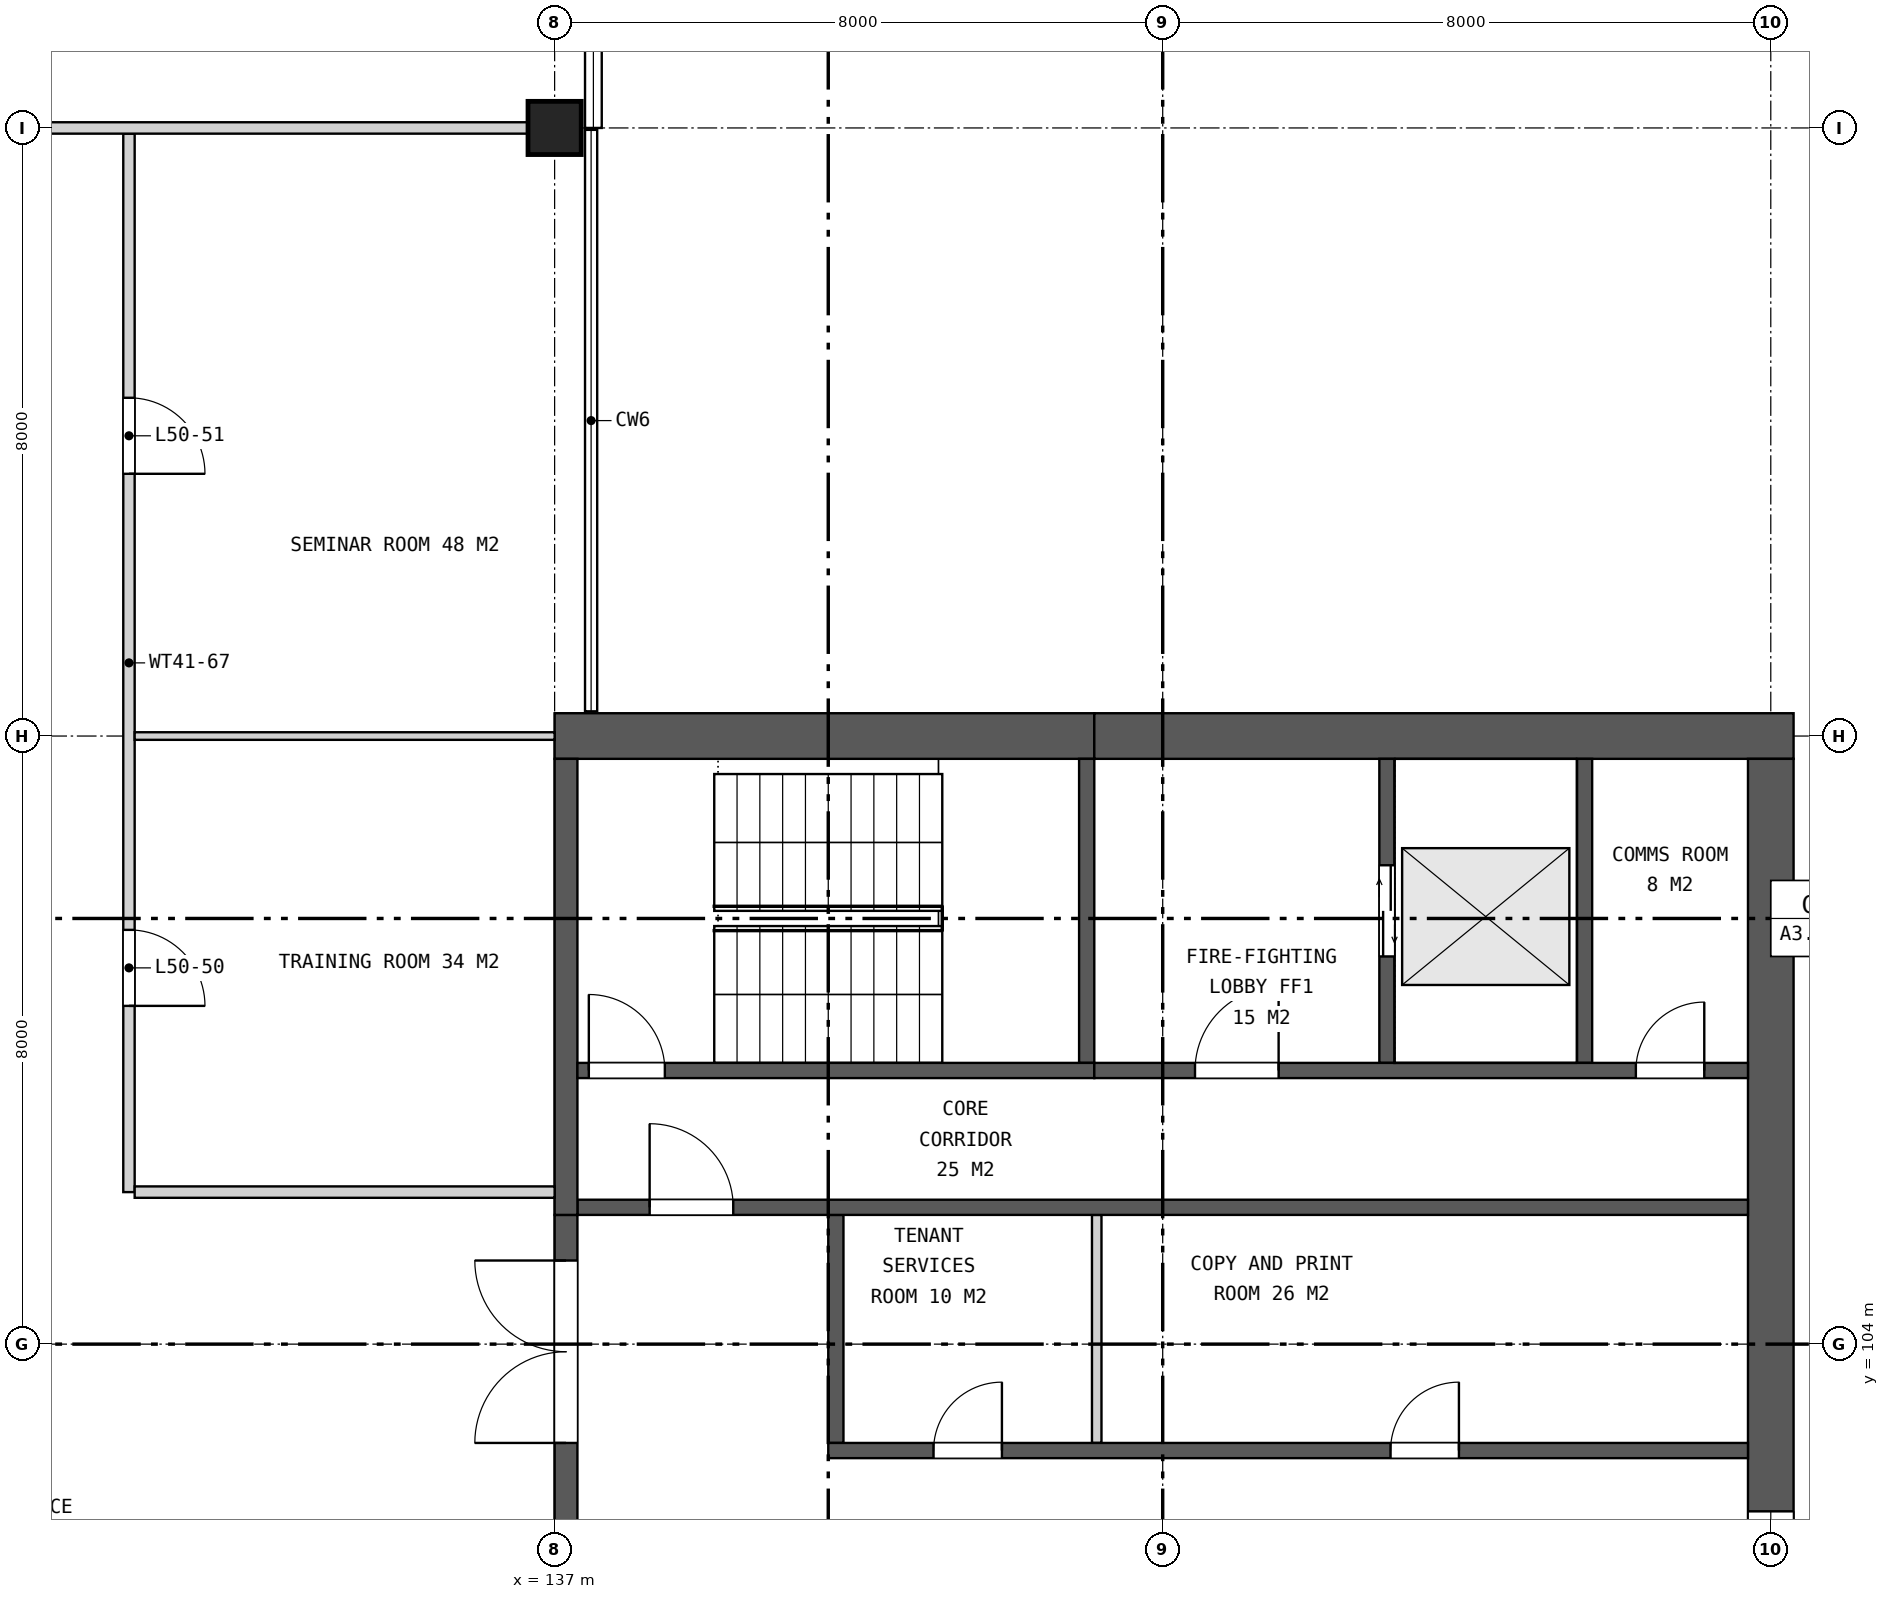
"""IFC4 building model, lengths in metres.
Left out: names, types, materials, properties, quantities, classifications, styles, units other than length and angle.
Written with IfcOpenShell. Run it as: python <this file> out.ifc"""

import sys

from ifc_helpers import new_model, si_unit, direction, frame, frame_2d, origin, origin_2d, place, context, subcontext, project, spatial, rectangle, extrude, element, fill, save


model = new_model("IFC4")
c1 = context("Model", 3, precision=1e-05, world=origin(), true_north=direction((0.0, 1.0)))
c2 = subcontext(c1, "Body", "Model", "MODEL_VIEW")
j1 = project(units=[si_unit("LENGTHUNIT", "METRE"), si_unit("PLANEANGLEUNIT", "RADIAN")], contexts=[c1])
p1 = place(None, origin())
s1 = spatial("IfcSite", under=j1, at=p1, CompositionType="ELEMENT")
p2 = place(p1, origin())
s2 = spatial("IfcBuilding", under=s1, at=p2, CompositionType="ELEMENT")
p3 = place(p2, frame((0.0, 0.0, 233.5)))
s3 = spatial("IfcBuildingStorey", under=s2, at=p3, CompositionType="ELEMENT", Elevation=233.5)
p4 = place(p3, frame((137.0, 120.0, 0.0), z_axis=(0.0, 0.0, 1.0), x_axis=(1.0, 0.0, 0.0)))
e1 = element("IfcColumn", 1, at=p4, inside=s3, PredefinedType="COLUMN", context=c2, shape_type="SweptSolid", body=[
    extrude(rectangle(XDim=0.7, YDim=0.7, at=origin_2d()), origin(), (0.0, 0.0, 1.0), 4.2),
])
p5 = place(p3, frame((137.0, 112.0, 0.0), z_axis=(0.0, 0.0, 1.0), x_axis=(1.0, 0.0, 0.0)))
e2 = element("IfcWall", 2, at=p5, inside=s3, PredefinedType="SHEAR", context=c2, shape_type="SweptSolid", body=[
    extrude(rectangle(XDim=7.1, YDim=0.6, at=frame_2d((3.55, 0.0))), origin(), (0.0, 0.0, 1.0), 4.2),
])
p6 = place(p3, frame((144.1, 112.0, 0.0), z_axis=(0.0, 0.0, 1.0), x_axis=(1.0, 0.0, 0.0)))
e3 = element("IfcWall", 3, at=p6, inside=s3, PredefinedType="SHEAR", context=c2, shape_type="SweptSolid", body=[
    extrude(rectangle(XDim=9.2, YDim=0.6, at=frame_2d((4.6, 0.0))), origin(), (0.0, 0.0, 1.0), 4.2),
])
p7 = place(p3, frame((153.0, 88.3, 0.0), z_axis=(0.0, 0.0, 1.0), x_axis=(0.0, 1.0, 0.0)))
e4 = element("IfcWall", 4, at=p7, inside=s3, PredefinedType="SHEAR", context=c2, shape_type="SweptSolid", body=[
    extrude(rectangle(XDim=23.4, YDim=0.6, at=frame_2d((11.7, 0.0))), origin(), (0.0, 0.0, 1.0), 4.2),
])
p8 = place(p7, frame((9.9, 0.0, 0.15)))
e5 = element("IfcOpeningElement", 5, at=p8, cuts=e4, PredefinedType="OPENING", context=c2, shape_type="SweptSolid", body=[
    extrude(rectangle(XDim=3.6, YDim=3.0, at=frame_2d((1.8, 1.5))), frame((0.0, 0.31, 0.0), z_axis=(0.0, -1.0, 0.0), x_axis=(1.0, 0.0, 0.0)), (0.0, 0.0, 1.0), 0.62),
])
p9 = place(p3, frame((137.15, 94.3, 0.0), z_axis=(0.0, 0.0, 1.0), x_axis=(0.0, 1.0, 0.0)))
e6 = element("IfcWall", 6, at=p9, inside=s3, PredefinedType="SHEAR", context=c2, shape_type="SweptSolid", body=[
    extrude(rectangle(XDim=11.4, YDim=0.3, at=frame_2d((5.7, 0.0))), origin(), (0.0, 0.0, 1.0), 4.2),
])
p10 = place(p9, frame((0.6, 0.0, 0.0)))
e7 = element("IfcOpeningElement", 7, at=p10, cuts=e6, PredefinedType="OPENING", context=c2, shape_type="SweptSolid", body=[
    extrude(rectangle(XDim=2.4, YDim=2.4, at=frame_2d((1.2, 1.2))), frame((0.0, 0.16, 0.0), z_axis=(0.0, -1.0, 0.0), x_axis=(1.0, 0.0, 0.0)), (0.0, 0.0, 1.0), 0.32),
])
p11 = place(p9, frame((4.5, 0.0, 0.0)))
e8 = element("IfcOpeningElement", 8, at=p11, cuts=e6, PredefinedType="OPENING", context=c2, shape_type="SweptSolid", body=[
    extrude(rectangle(XDim=2.4, YDim=2.4, at=frame_2d((1.2, 1.2))), frame((0.0, 0.16, 0.0), z_axis=(0.0, -1.0, 0.0), x_axis=(1.0, 0.0, 0.0)), (0.0, 0.0, 1.0), 0.32),
])
p12 = place(p9, frame((8.4, 0.0, 0.0)))
e9 = element("IfcOpeningElement", 9, at=p12, cuts=e6, PredefinedType="OPENING", context=c2, shape_type="SweptSolid", body=[
    extrude(rectangle(XDim=2.4, YDim=2.4, at=frame_2d((1.2, 1.2))), frame((0.0, 0.16, 0.0), z_axis=(0.0, -1.0, 0.0), x_axis=(1.0, 0.0, 0.0)), (0.0, 0.0, 1.0), 0.32),
])
p13 = place(p3, frame((140.7, 102.7, 0.0), z_axis=(0.0, 0.0, 1.0), x_axis=(0.0, 1.0, 0.0)))
e10 = element("IfcWall", 10, at=p13, inside=s3, PredefinedType="SHEAR", context=c2, shape_type="SweptSolid", body=[
    extrude(rectangle(XDim=3.0, YDim=0.2, at=frame_2d((1.5, 0.0))), origin(), (0.0, 0.0, 1.0), 4.2),
])
p14 = place(p3, frame((144.132, 102.7, 0.0), z_axis=(0.0, 0.0, 1.0), x_axis=(0.0, 1.0, 0.0)))
e11 = element("IfcWall", 11, at=p14, inside=s3, PredefinedType="PARTITIONING", context=c2, shape_type="SweptSolid", body=[
    extrude(rectangle(XDim=3.0, YDim=0.125, at=frame_2d((1.5, 0.0))), origin(), (0.0, 0.0, 1.0), 4.2),
])
p15 = place(p3, frame((140.6, 102.6, 0.0), z_axis=(0.0, 0.0, 1.0), x_axis=(1.0, 0.0, 0.0)))
e12 = element("IfcWall", 12, at=p15, inside=s3, PredefinedType="SHEAR", context=c2, shape_type="SweptSolid", body=[
    extrude(rectangle(XDim=12.1, YDim=0.2, at=frame_2d((6.05, 0.0))), origin(), (0.0, 0.0, 1.0), 4.2),
])
p16 = place(p15, frame((1.385, 0.0, 0.0)))
e13 = element("IfcOpeningElement", 13, at=p16, cuts=e12, PredefinedType="OPENING", context=c2, shape_type="SweptSolid", body=[
    extrude(rectangle(XDim=0.9, YDim=2.1, at=frame_2d((0.45, 1.05))), frame((0.0, 0.11, 0.0), z_axis=(0.0, -1.0, 0.0), x_axis=(1.0, 0.0, 0.0)), (0.0, 0.0, 1.0), 0.22),
])
p17 = place(p15, frame((7.397, 0.0, 0.0)))
e14 = element("IfcOpeningElement", 14, at=p17, cuts=e12, PredefinedType="OPENING", context=c2, shape_type="SweptSolid", body=[
    extrude(rectangle(XDim=0.9, YDim=2.1, at=frame_2d((0.45, 1.05))), frame((0.0, 0.11, 0.0), z_axis=(0.0, -1.0, 0.0), x_axis=(1.0, 0.0, 0.0)), (0.0, 0.0, 1.0), 0.22),
])
p18 = place(p3, frame((137.3, 105.8, 0.0), z_axis=(0.0, 0.0, 1.0), x_axis=(1.0, 0.0, 0.0)))
e15 = element("IfcWall", 15, at=p18, inside=s3, PredefinedType="SHEAR", context=c2, shape_type="SweptSolid", body=[
    extrude(rectangle(XDim=15.4, YDim=0.2, at=frame_2d((7.7, 0.0))), origin(), (0.0, 0.0, 1.0), 4.2),
])
p19 = place(p18, frame((0.95, 0.0, 0.0)))
e16 = element("IfcOpeningElement", 16, at=p19, cuts=e15, PredefinedType="OPENING", context=c2, shape_type="SweptSolid", body=[
    extrude(rectangle(XDim=1.1, YDim=2.1, at=frame_2d((0.55, 1.05))), frame((0.0, 0.11, 0.0), z_axis=(0.0, -1.0, 0.0), x_axis=(1.0, 0.0, 0.0)), (0.0, 0.0, 1.0), 0.22),
])
p20 = place(p3, frame((137.15, 105.7, 0.0), z_axis=(0.0, 0.0, 1.0), x_axis=(0.0, 1.0, 0.0)))
e17 = element("IfcWall", 17, at=p20, inside=s3, PredefinedType="SHEAR", context=c2, shape_type="SweptSolid", body=[
    extrude(rectangle(XDim=6.0, YDim=0.3, at=frame_2d((3.0, 0.0))), origin(), (0.0, 0.0, 1.0), 4.2),
])
p21 = place(p3, frame((144.0, 107.7, 0.0), z_axis=(0.0, 0.0, 1.0), x_axis=(0.0, 1.0, 0.0)))
e18 = element("IfcWall", 18, at=p21, inside=s3, PredefinedType="SHEAR", context=c2, shape_type="SweptSolid", body=[
    extrude(rectangle(XDim=4.0, YDim=0.2, at=frame_2d((2.0, 0.0))), origin(), (0.0, 0.0, 1.0), 4.2),
])
p22 = place(p3, frame((147.95, 107.7, 0.0), z_axis=(0.0, 0.0, 1.0), x_axis=(0.0, 1.0, 0.0)))
e19 = element("IfcWall", 19, at=p22, inside=s3, PredefinedType="SHEAR", context=c2, shape_type="SweptSolid", body=[
    extrude(rectangle(XDim=4.0, YDim=0.2, at=frame_2d((2.0, 0.0))), origin(), (0.0, 0.0, 1.0), 4.2),
])
p23 = place(p22, frame((1.4, 0.0, 0.0)))
e20 = element("IfcOpeningElement", 20, at=p23, cuts=e19, PredefinedType="OPENING", context=c2, shape_type="SweptSolid", body=[
    extrude(rectangle(XDim=1.2, YDim=2.1, at=frame_2d((0.6, 1.05))), frame((0.0, 0.11, 0.0), z_axis=(0.0, -1.0, 0.0), x_axis=(1.0, 0.0, 0.0)), (0.0, 0.0, 1.0), 0.22),
])
p24 = place(p3, frame((150.55, 107.7, 0.0), z_axis=(0.0, 0.0, 1.0), x_axis=(0.0, 1.0, 0.0)))
e21 = element("IfcWall", 21, at=p24, inside=s3, PredefinedType="SHEAR", context=c2, shape_type="SweptSolid", body=[
    extrude(rectangle(XDim=4.0, YDim=0.2, at=frame_2d((2.0, 0.0))), origin(), (0.0, 0.0, 1.0), 4.2),
])
p25 = place(p3, frame((137.3, 107.6, 0.0), z_axis=(0.0, 0.0, 1.0), x_axis=(1.0, 0.0, 0.0)))
e22 = element("IfcWall", 22, at=p25, inside=s3, PredefinedType="SHEAR", context=c2, shape_type="SweptSolid", body=[
    extrude(rectangle(XDim=6.8, YDim=0.2, at=frame_2d((3.4, 0.0))), origin(), (0.0, 0.0, 1.0), 4.2),
])
p26 = place(p25, frame((0.15, 0.0, 0.0)))
e23 = element("IfcOpeningElement", 23, at=p26, cuts=e22, PredefinedType="OPENING", context=c2, shape_type="SweptSolid", body=[
    extrude(rectangle(XDim=1.0, YDim=2.1, at=frame_2d((0.5, 1.05))), frame((0.0, 0.11, 0.0), z_axis=(0.0, -1.0, 0.0), x_axis=(1.0, 0.0, 0.0)), (0.0, 0.0, 1.0), 0.22),
])
p27 = place(p3, frame((144.1, 107.6, 0.0), z_axis=(0.0, 0.0, 1.0), x_axis=(1.0, 0.0, 0.0)))
e24 = element("IfcWall", 24, at=p27, inside=s3, PredefinedType="SHEAR", context=c2, shape_type="SweptSolid", body=[
    extrude(rectangle(XDim=8.6, YDim=0.2, at=frame_2d((4.3, 0.0))), origin(), (0.0, 0.0, 1.0), 4.2),
])
p28 = place(p27, frame((1.325, 0.0, 0.0)))
e25 = element("IfcOpeningElement", 25, at=p28, cuts=e24, PredefinedType="OPENING", context=c2, shape_type="SweptSolid", body=[
    extrude(rectangle(XDim=1.1, YDim=2.1, at=frame_2d((0.55, 1.05))), frame((0.0, 0.11, 0.0), z_axis=(0.0, -1.0, 0.0), x_axis=(1.0, 0.0, 0.0)), (0.0, 0.0, 1.0), 0.22),
])
p29 = place(p27, frame((7.125, 0.0, 0.0)))
e26 = element("IfcOpeningElement", 26, at=p29, cuts=e24, PredefinedType="OPENING", context=c2, shape_type="SweptSolid", body=[
    extrude(rectangle(XDim=0.9, YDim=2.1, at=frame_2d((0.45, 1.05))), frame((0.0, 0.11, 0.0), z_axis=(0.0, -1.0, 0.0), x_axis=(1.0, 0.0, 0.0)), (0.0, 0.0, 1.0), 0.22),
])
p30 = place(p3, frame((131.4, 106.0, 0.0), z_axis=(0.0, 0.0, 1.0), x_axis=(0.0, 1.0, 0.0)))
e27 = element("IfcWall", 27, at=p30, inside=s3, PredefinedType="PARTITIONING", context=c2, shape_type="SweptSolid", body=[
    extrude(rectangle(XDim=13.925, YDim=0.15, at=frame_2d((6.962, 0.0))), origin(), (0.0, 0.0, 1.0), 3.255),
])
p31 = place(p30, frame((2.45, 0.0, 0.0)))
e28 = element("IfcOpeningElement", 28, at=p31, cuts=e27, PredefinedType="OPENING", context=c2, shape_type="SweptSolid", body=[
    extrude(rectangle(XDim=1.0, YDim=2.1, at=frame_2d((0.5, 1.05))), frame((0.0, 0.085, 0.0), z_axis=(0.0, -1.0, 0.0), x_axis=(1.0, 0.0, 0.0)), (0.0, 0.0, 1.0), 0.17),
])
p32 = place(p30, frame((9.45, 0.0, 0.0)))
e29 = element("IfcOpeningElement", 29, at=p32, cuts=e27, PredefinedType="OPENING", context=c2, shape_type="SweptSolid", body=[
    extrude(rectangle(XDim=1.0, YDim=2.1, at=frame_2d((0.5, 1.05))), frame((0.0, 0.085, 0.0), z_axis=(0.0, -1.0, 0.0), x_axis=(1.0, 0.0, 0.0)), (0.0, 0.0, 1.0), 0.17),
])
p33 = place(p3, frame((131.475, 106.0, 0.0), z_axis=(0.0, 0.0, 1.0), x_axis=(1.0, 0.0, 0.0)))
e30 = element("IfcWall", 30, at=p33, inside=s3, PredefinedType="PARTITIONING", context=c2, shape_type="SweptSolid", body=[
    extrude(rectangle(XDim=5.525, YDim=0.15, at=frame_2d((2.762, 0.0))), origin(), (0.0, 0.0, 1.0), 3.255),
])
p34 = place(p3, frame((131.475, 112.0, 0.0), z_axis=(0.0, 0.0, 1.0), x_axis=(1.0, 0.0, 0.0)))
e31 = element("IfcWall", 31, at=p34, inside=s3, PredefinedType="PARTITIONING", context=c2, shape_type="SweptSolid", body=[
    extrude(rectangle(XDim=5.525, YDim=0.1, at=frame_2d((2.762, 0.0))), origin(), (0.0, 0.0, 1.0), 3.255),
])
p35 = place(p3, frame((118.7, 120.0, 0.0), z_axis=(0.0, 0.0, 1.0), x_axis=(1.0, 0.0, 0.0)))
e32 = element("IfcWall", 32, at=p35, inside=s3, PredefinedType="PARTITIONING", context=c2, shape_type="SweptSolid", body=[
    extrude(rectangle(XDim=18.62, YDim=0.15, at=frame_2d((9.31, 0.0))), origin(), (0.0, 0.0, 1.0), 3.255),
])
p36 = place(p35, frame((5.45, 0.0, 0.0)))
e33 = element("IfcOpeningElement", 33, at=p36, cuts=e32, PredefinedType="OPENING", context=c2, shape_type="SweptSolid", body=[
    extrude(rectangle(XDim=1.8, YDim=2.1, at=frame_2d((0.9, 1.05))), frame((0.0, 0.085, 0.0), z_axis=(0.0, -1.0, 0.0), x_axis=(1.0, 0.0, 0.0)), (0.0, 0.0, 1.0), 0.17),
])
p37 = place(p8, origin())
e34 = element("IfcWindow", 34, at=p37, inside=s3, PartitioningType="SINGLE_PANEL", PredefinedType="WINDOW", context=c2, shape_type="SweptSolid", body=[
    extrude(rectangle(XDim=3.6, YDim=3.0, at=frame_2d((1.8, 1.5))), frame((0.0, 0.03, 0.0), z_axis=(0.0, -1.0, 0.0), x_axis=(1.0, 0.0, 0.0)), (0.0, 0.0, 1.0), 0.06),
])
fill(e5, e34)
p38 = place(p12, origin())
e35 = element("IfcDoor", 35, at=p38, inside=s3, OperationType="DOUBLE_DOOR_SINGLE_SWING", PredefinedType="DOOR", context=c2, shape_type="SweptSolid", body=[
    extrude(rectangle(XDim=2.4, YDim=2.4, at=frame_2d((1.2, 1.2))), frame((0.0, 0.025, 0.0), z_axis=(0.0, -1.0, 0.0), x_axis=(1.0, 0.0, 0.0)), (0.0, 0.0, 1.0), 0.05),
])
fill(e9, e35)
p39 = place(p16, origin())
e36 = element("IfcDoor", 36, at=p39, inside=s3, OperationType="SINGLE_SWING_RIGHT", PredefinedType="DOOR", context=c2, shape_type="SweptSolid", body=[
    extrude(rectangle(XDim=0.9, YDim=2.1, at=frame_2d((0.45, 1.05))), frame((0.0, 0.025, 0.0), z_axis=(0.0, -1.0, 0.0), x_axis=(1.0, 0.0, 0.0)), (0.0, 0.0, 1.0), 0.05),
])
fill(e13, e36)
p40 = place(p17, origin())
e37 = element("IfcDoor", 37, at=p40, inside=s3, OperationType="SINGLE_SWING_RIGHT", PredefinedType="DOOR", context=c2, shape_type="SweptSolid", body=[
    extrude(rectangle(XDim=0.9, YDim=2.1, at=frame_2d((0.45, 1.05))), frame((0.0, 0.025, 0.0), z_axis=(0.0, -1.0, 0.0), x_axis=(1.0, 0.0, 0.0)), (0.0, 0.0, 1.0), 0.05),
])
fill(e14, e37)
p41 = place(p19, origin())
e38 = element("IfcDoor", 38, at=p41, inside=s3, OperationType="SINGLE_SWING_LEFT", PredefinedType="DOOR", context=c2, shape_type="SweptSolid", body=[
    extrude(rectangle(XDim=1.1, YDim=2.1, at=frame_2d((0.55, 1.05))), frame((0.0, 0.025, 0.0), z_axis=(0.0, -1.0, 0.0), x_axis=(1.0, 0.0, 0.0)), (0.0, 0.0, 1.0), 0.05),
])
fill(e16, e38)
p42 = place(p23, origin())
e39 = element("IfcDoor", 39, at=p42, inside=s3, OperationType="DOUBLE_DOOR_SLIDING", PredefinedType="DOOR", context=c2, shape_type="SweptSolid", body=[
    extrude(rectangle(XDim=1.2, YDim=2.1, at=frame_2d((0.6, 1.05))), frame((0.0, 0.025, 0.0), z_axis=(0.0, -1.0, 0.0), x_axis=(1.0, 0.0, 0.0)), (0.0, 0.0, 1.0), 0.05),
])
fill(e20, e39)
p43 = place(p26, origin())
e40 = element("IfcDoor", 40, at=p43, inside=s3, OperationType="SINGLE_SWING_LEFT", PredefinedType="DOOR", context=c2, shape_type="SweptSolid", body=[
    extrude(rectangle(XDim=1.0, YDim=2.1, at=frame_2d((0.5, 1.05))), frame((0.0, 0.025, 0.0), z_axis=(0.0, -1.0, 0.0), x_axis=(1.0, 0.0, 0.0)), (0.0, 0.0, 1.0), 0.05),
])
fill(e23, e40)
p44 = place(p28, origin())
e41 = element("IfcDoor", 41, at=p44, inside=s3, OperationType="SINGLE_SWING_RIGHT", PredefinedType="DOOR", context=c2, shape_type="SweptSolid", body=[
    extrude(rectangle(XDim=1.1, YDim=2.1, at=frame_2d((0.55, 1.05))), frame((0.0, 0.025, 0.0), z_axis=(0.0, -1.0, 0.0), x_axis=(1.0, 0.0, 0.0)), (0.0, 0.0, 1.0), 0.05),
])
fill(e25, e41)
p45 = place(p29, origin())
e42 = element("IfcDoor", 42, at=p45, inside=s3, OperationType="SINGLE_SWING_RIGHT", PredefinedType="DOOR", context=c2, shape_type="SweptSolid", body=[
    extrude(rectangle(XDim=0.9, YDim=2.1, at=frame_2d((0.45, 1.05))), frame((0.0, 0.025, 0.0), z_axis=(0.0, -1.0, 0.0), x_axis=(1.0, 0.0, 0.0)), (0.0, 0.0, 1.0), 0.05),
])
fill(e26, e42)
p46 = place(p31, frame((1.0, 0.0, 0.0), z_axis=(0.0, 0.0, 1.0), x_axis=(-1.0, 0.0, 0.0)))
e43 = element("IfcDoor", 43, at=p46, inside=s3, OperationType="SINGLE_SWING_RIGHT", PredefinedType="DOOR", context=c2, shape_type="SweptSolid", body=[
    extrude(rectangle(XDim=1.0, YDim=2.1, at=frame_2d((0.5, 1.05))), frame((0.0, 0.025, 0.0), z_axis=(0.0, -1.0, 0.0), x_axis=(1.0, 0.0, 0.0)), (0.0, 0.0, 1.0), 0.05),
])
fill(e28, e43)
p47 = place(p32, frame((1.0, 0.0, 0.0), z_axis=(0.0, 0.0, 1.0), x_axis=(-1.0, 0.0, 0.0)))
e44 = element("IfcDoor", 44, at=p47, inside=s3, OperationType="SINGLE_SWING_RIGHT", PredefinedType="DOOR", context=c2, shape_type="SweptSolid", body=[
    extrude(rectangle(XDim=1.0, YDim=2.1, at=frame_2d((0.5, 1.05))), frame((0.0, 0.025, 0.0), z_axis=(0.0, -1.0, 0.0), x_axis=(1.0, 0.0, 0.0)), (0.0, 0.0, 1.0), 0.05),
])
fill(e29, e44)
save(model, sys.argv[1])
